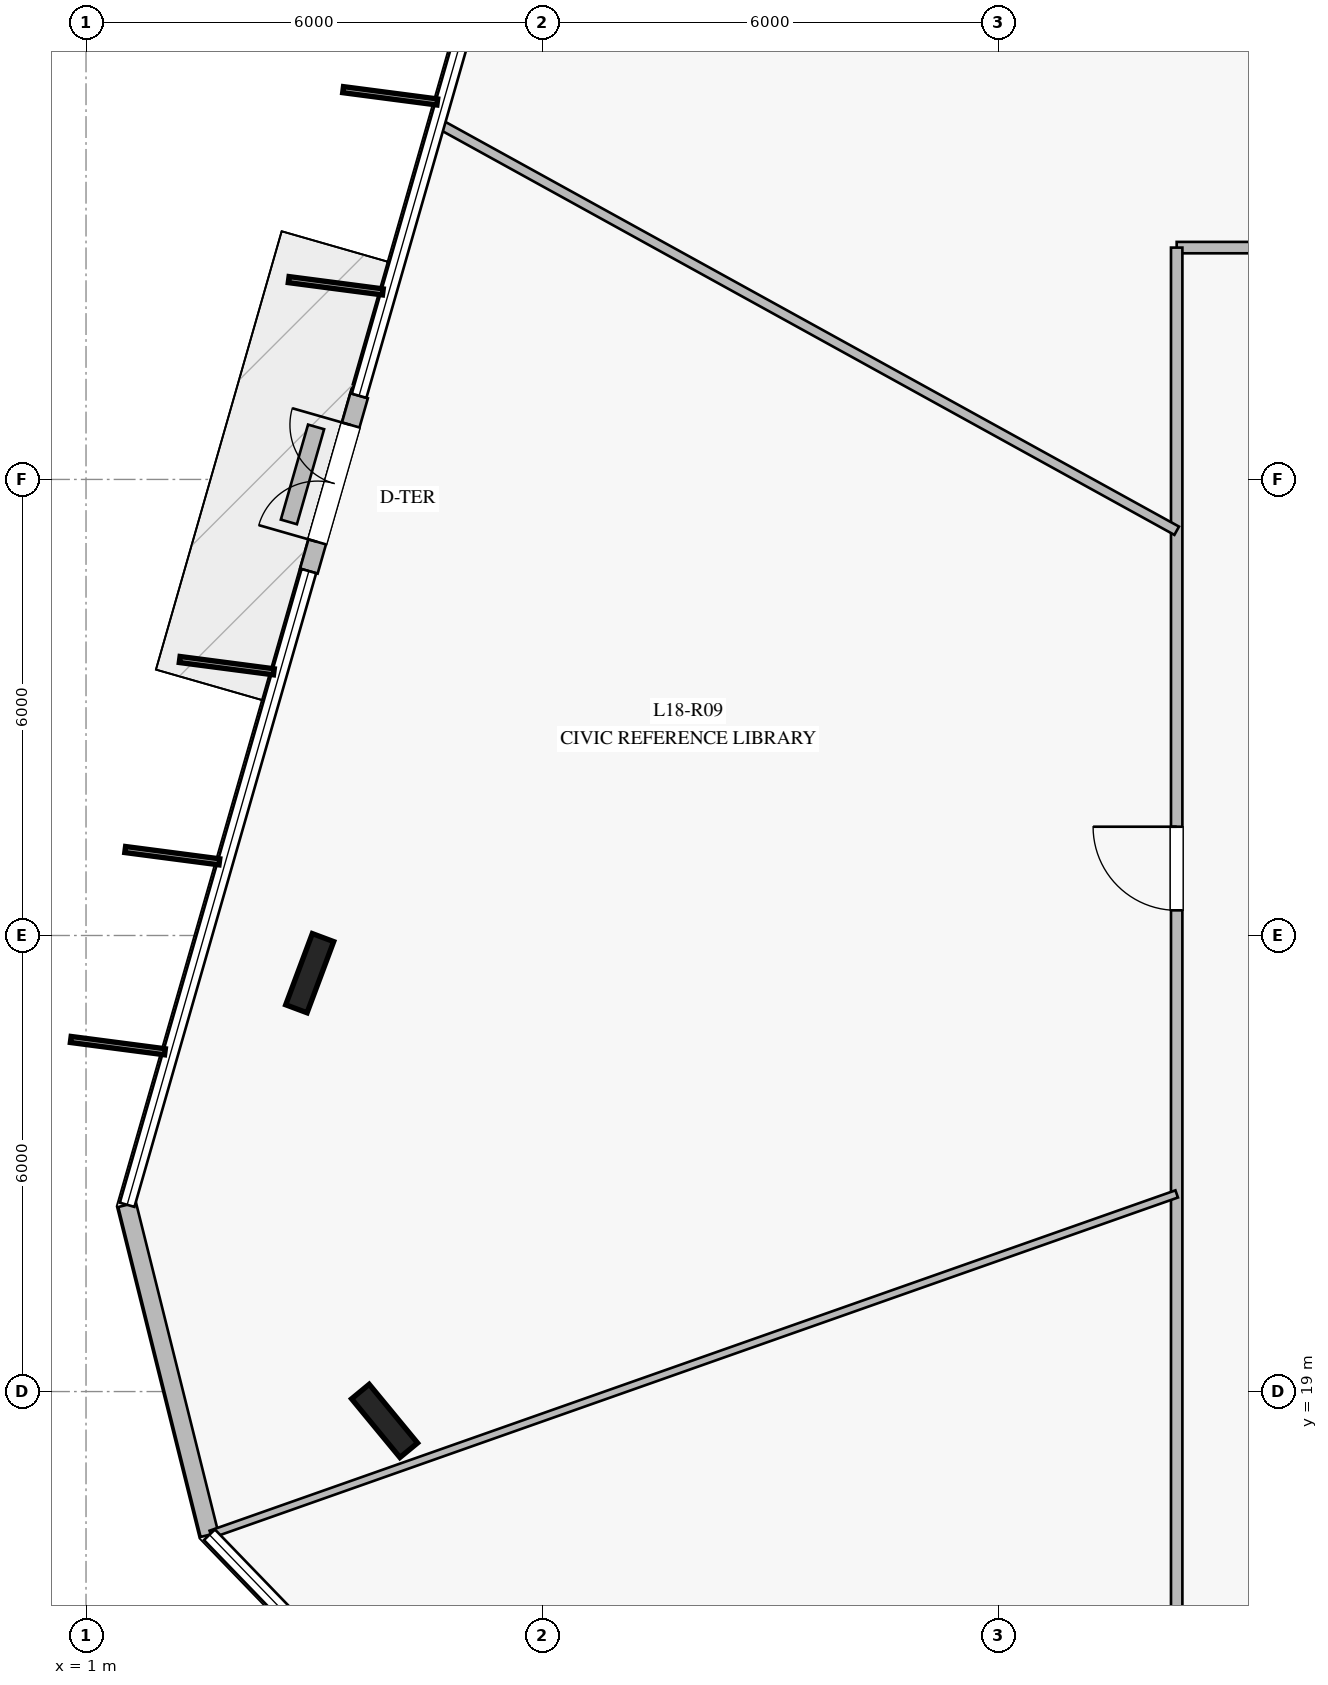
"""IFC4 building model, lengths in metres.
Left out: names, types, materials, properties, quantities, classifications, styles, units other than length and angle.
Written with IfcOpenShell. Run it as: python <this file> out.ifc"""

import sys

from ifc_helpers import new_model, si_unit, direction, frame, frame_2d, origin, origin_2d, place, context, subcontext, project, spatial, rectangle, i_section, extrude, element, fill, save


model = new_model("IFC4")
c1 = context("Model", 3, precision=1e-05, world=origin(), true_north=direction((0.0, 1.0)))
c2 = subcontext(c1, "Body", "Model", "MODEL_VIEW")
j1 = project(units=[si_unit("LENGTHUNIT", "METRE"), si_unit("PLANEANGLEUNIT", "RADIAN")], contexts=[c1])
p1 = place(None, origin())
s1 = spatial("IfcSite", under=j1, at=p1, CompositionType="ELEMENT")
p2 = place(p1, origin())
s2 = spatial("IfcBuilding", under=s1, at=p2, CompositionType="ELEMENT")
p3 = place(p2, frame((0.0, 0.0, 76.0)))
s3 = spatial("IfcBuildingStorey", under=s2, at=p3, CompositionType="ELEMENT", Elevation=76.0)
for number, where, z_axis, x_axis in (
    (1, (3.943, 24.504, 0.0), (0.0, 0.0, 1.0), (0.35, 0.937, 0.0)),
    (2, (4.928, 18.614, 0.0), (0.0, 0.0, 1.0), (-0.636, 0.772, 0.0)),
):
    element("IfcColumn", number, at=place(p3, frame(where, z_axis=z_axis, x_axis=x_axis)), inside=s3, PredefinedType="COLUMN", context=c2, shape_type="SweptSolid", body=[
        extrude(i_section(OverallWidth=0.3, OverallDepth=1.0, WebThickness=0.019, FlangeThickness=0.036, at=origin_2d()), origin(), (0.0, 0.0, 1.0), 4.0),
    ])
p4 = place(p3, frame((4.593, 32.101, 0.0), z_axis=(0.0, 0.0, 1.0), x_axis=(-0.275473430744, -0.961308685571, 0.0)))
e3 = element("IfcWall", 3, at=p4, inside=s3, PredefinedType="STANDARD", context=c2, shape_type="SweptSolid", body=[
    extrude(rectangle(XDim=2.4, YDim=0.24, at=frame_2d((1.2, 0.0))), origin(), (0.0, 0.0, 1.0), 3.76),
])
p5 = place(p4, frame((0.4, 0.0, 0.0)))
e4 = element("IfcOpeningElement", 4, at=p5, cuts=e3, PredefinedType="OPENING", context=c2, shape_type="SweptSolid", body=[
    extrude(rectangle(XDim=1.6, YDim=2.25, at=frame_2d((0.8, 1.125))), frame((0.0, 0.13, 0.0), z_axis=(0.0, -1.0, 0.0), x_axis=(1.0, 0.0, 0.0)), (0.0, 0.0, 1.0), 0.26),
])
p6 = place(p3, frame((1.541, 21.457, 0.0), z_axis=(0.0, 0.0, 1.0), x_axis=(0.242060539471, -0.970261147955, 0.0)))
e5 = element("IfcWall", 5, at=p6, inside=s3, PredefinedType="STANDARD", context=c2, shape_type="SweptSolid", body=[
    extrude(rectangle(XDim=4.474, YDim=0.24, at=frame_2d((2.237, 0.0))), origin(), (0.0, 0.0, 1.0), 3.76),
])
p7 = place(p3, frame((4.027, 31.691, 0.0), z_axis=(0.0, 0.0, 1.0), x_axis=(-0.275440197567, -0.961318208277, 0.0)))
e6 = element("IfcWall", 6, at=p7, inside=s3, PredefinedType="USERDEFINED", context=c2, shape_type="SweptSolid", body=[
    extrude(rectangle(XDim=1.3, YDim=0.22, at=frame_2d((0.65, 0.0))), origin(), (0.0, 0.0, 1.0), 0.4),
])
p8 = place(p3, frame((15.35, 34.05, 0.0), z_axis=(0.0, 0.0, 1.0), x_axis=(1.0, 0.0, 0.0)))
e7 = element("IfcWall", 7, at=p8, inside=s3, PredefinedType="PARTITIONING", context=c2, shape_type="SweptSolid", body=[
    extrude(rectangle(XDim=19.3, YDim=0.15, at=frame_2d((9.65, 0.0))), origin(), (0.0, 0.0, 1.0), 3.21),
])
p9 = place(p8, frame((16.808, 0.0, 0.0)))
e8 = element("IfcOpeningElement", 8, at=p9, cuts=e7, PredefinedType="OPENING", context=c2, shape_type="SweptSolid", body=[
    extrude(rectangle(XDim=1.1, YDim=2.2, at=frame_2d((0.55, 1.1))), frame((0.0, 0.085, 0.0), z_axis=(0.0, -1.0, 0.0), x_axis=(1.0, 0.0, 0.0)), (0.0, 0.0, 1.0), 0.17),
])
p10 = place(p8, frame((10.941, 0.0, 0.0)))
e9 = element("IfcOpeningElement", 9, at=p10, cuts=e7, PredefinedType="OPENING", context=c2, shape_type="SweptSolid", body=[
    extrude(rectangle(XDim=1.1, YDim=2.2, at=frame_2d((0.55, 1.1))), frame((0.0, 0.085, 0.0), z_axis=(0.0, -1.0, 0.0), x_axis=(1.0, 0.0, 0.0)), (0.0, 0.0, 1.0), 0.17),
])
p11 = place(p8, frame((3.321, 0.0, 0.0)))
e10 = element("IfcOpeningElement", 10, at=p11, cuts=e7, PredefinedType="OPENING", context=c2, shape_type="SweptSolid", body=[
    extrude(rectangle(XDim=1.1, YDim=2.2, at=frame_2d((0.55, 1.1))), frame((0.0, 0.085, 0.0), z_axis=(0.0, -1.0, 0.0), x_axis=(1.0, 0.0, 0.0)), (0.0, 0.0, 1.0), 0.17),
])
p12 = place(p3, frame((15.35, 15.95, 0.0), z_axis=(0.0, 0.0, 1.0), x_axis=(0.0, 1.0, 0.0)))
e11 = element("IfcWall", 11, at=p12, inside=s3, PredefinedType="PARTITIONING", context=c2, shape_type="SweptSolid", body=[
    extrude(rectangle(XDim=18.1, YDim=0.15, at=frame_2d((9.05, 0.0))), origin(), (0.0, 0.0, 1.0), 3.21),
])
p13 = place(p12, frame((9.381, 0.0, 0.0)))
e12 = element("IfcOpeningElement", 12, at=p13, cuts=e11, PredefinedType="OPENING", context=c2, shape_type="SweptSolid", body=[
    extrude(rectangle(XDim=1.1, YDim=2.2, at=frame_2d((0.55, 1.1))), frame((0.0, 0.085, 0.0), z_axis=(0.0, -1.0, 0.0), x_axis=(1.0, 0.0, 0.0)), (0.0, 0.0, 1.0), 0.17),
])
p14 = place(p3, frame((15.35, 30.325, 0.0), z_axis=(0.0, 0.0, 1.0), x_axis=(-0.875614283025, 0.483011001285, 0.0)))
e13 = element("IfcWall", 13, at=p14, inside=s3, PredefinedType="PARTITIONING", context=c2, shape_type="SweptSolid", body=[
    extrude(rectangle(XDim=11.091, YDim=0.125, at=frame_2d((5.545, 0.0))), origin(), (0.0, 0.0, 1.0), 3.06),
])
p15 = place(p3, frame((15.35, 21.6, 0.0), z_axis=(0.0, 0.0, 1.0), x_axis=(-0.943156803456, -0.332348076712, 0.0)))
e14 = element("IfcWall", 14, at=p15, inside=s3, PredefinedType="MOVABLE", context=c2, shape_type="SweptSolid", body=[
    extrude(rectangle(XDim=13.474, YDim=0.1, at=frame_2d((6.737, 0.0))), origin(), (0.0, 0.0, 1.0), 3.06),
])
p16 = place(p5, frame((1.6, 0.0, 0.0), z_axis=(0.0, 0.0, 1.0), x_axis=(-1.0, 0.0, 0.0)))
e15 = element("IfcDoor", 15, at=p16, inside=s3, OperationType="DOUBLE_DOOR_SINGLE_SWING", PredefinedType="DOOR", context=c2, shape_type="SweptSolid", body=[
    extrude(rectangle(XDim=1.6, YDim=2.25, at=frame_2d((0.8, 1.125))), frame((0.0, 0.025, 0.0), z_axis=(0.0, -1.0, 0.0), x_axis=(1.0, 0.0, 0.0)), (0.0, 0.0, 1.0), 0.05),
])
fill(e4, e15)
p17 = place(p13, origin())
e16 = element("IfcDoor", 16, at=p17, inside=s3, OperationType="SINGLE_SWING_RIGHT", PredefinedType="DOOR", context=c2, shape_type="SweptSolid", body=[
    extrude(rectangle(XDim=1.1, YDim=2.2, at=frame_2d((0.55, 1.1))), frame((0.0, 0.025, 0.0), z_axis=(0.0, -1.0, 0.0), x_axis=(1.0, 0.0, 0.0)), (0.0, 0.0, 1.0), 0.05),
])
fill(e12, e16)
save(model, sys.argv[1])
